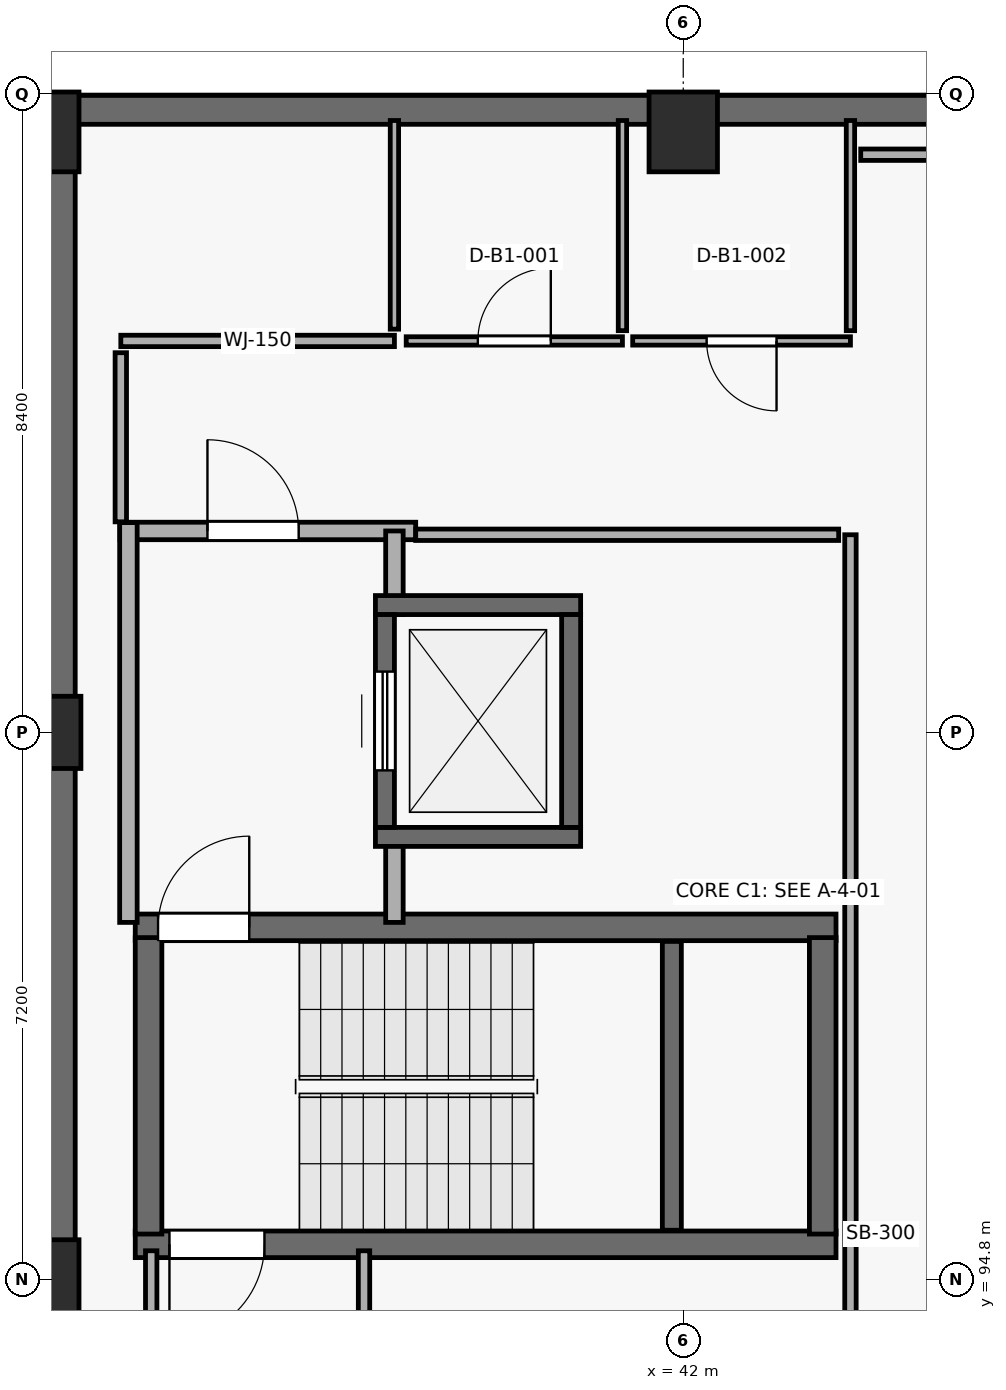
"""IFC4 building model, lengths in metres.
Left out: names, types, materials, properties, quantities, classifications, styles, units other than length and angle.
Written with IfcOpenShell. Run it as: python <this file> out.ifc"""

import sys

from ifc_helpers import new_model, si_unit, direction, frame, frame_2d, origin, origin_2d, place, context, subcontext, project, spatial, rectangle, extrude, element, fill, save


model = new_model("IFC4")
c1 = context("Model", 3, precision=1e-05, world=origin(), true_north=direction((0.0, 1.0)))
c2 = subcontext(c1, "Body", "Model", "MODEL_VIEW")
j1 = project(units=[si_unit("LENGTHUNIT", "METRE"), si_unit("PLANEANGLEUNIT", "RADIAN")], contexts=[c1])
p1 = place(None, origin())
s1 = spatial("IfcSite", under=j1, at=p1, CompositionType="ELEMENT")
p2 = place(p1, origin())
s2 = spatial("IfcBuilding", under=s1, at=p2, CompositionType="ELEMENT")
p3 = place(p2, frame((0.0, 0.0, -4.5)))
s3 = spatial("IfcBuildingStorey", under=s2, at=p3, CompositionType="ELEMENT", Elevation=-4.5)
p4 = place(p3, frame((33.6, 94.8, -0.3), z_axis=(0.0, 0.0, 1.0), x_axis=(1.0, 0.0, 0.0)))
e1 = element("IfcColumn", 1, at=p4, inside=s3, PredefinedType="COLUMN", context=c2, shape_type="SweptSolid", body=[
    extrude(rectangle(XDim=0.9, YDim=1.05, at=origin_2d()), origin(), (0.0, 0.0, 1.0), 4.8),
])
p5 = place(p3, frame((33.6, 102.0, -0.3), z_axis=(0.0, 0.0, 1.0), x_axis=(1.0, 0.0, 0.0)))
e2 = element("IfcColumn", 2, at=p5, inside=s3, PredefinedType="COLUMN", context=c2, shape_type="SweptSolid", body=[
    extrude(rectangle(XDim=0.95, YDim=0.95, at=origin_2d()), origin(), (0.0, 0.0, 1.0), 4.8),
])
for number, where, z_axis, x_axis in (
    (3, (33.6, 109.9, -0.3), (0.0, 0.0, 1.0), (1.0, 0.0, 0.0)),
    (4, (42.0, 109.9, -0.3), (0.0, 0.0, 1.0), (1.0, 0.0, 0.0)),
):
    element("IfcColumn", number, at=place(p3, frame(where, z_axis=z_axis, x_axis=x_axis)), inside=s3, PredefinedType="COLUMN", context=c2, shape_type="SweptSolid", body=[
        extrude(rectangle(XDim=0.9, YDim=1.05, at=origin_2d()), origin(), (0.0, 0.0, 1.0), 4.8),
    ])
p6 = place(p3, frame((33.81, 80.4, 0.0), z_axis=(0.0, 0.0, 1.0), x_axis=(0.0, 1.0, 0.0)))
e5 = element("IfcWall", 5, at=p6, inside=s3, PredefinedType="SOLIDWALL", context=c2, shape_type="SweptSolid", body=[
    extrude(rectangle(XDim=30.0, YDim=0.38, at=frame_2d((15.0, 0.0))), origin(), (0.0, 0.0, 1.0), 4.22),
])
p7 = place(p3, frame((33.6, 110.19, 0.0), z_axis=(0.0, 0.0, 1.0), x_axis=(1.0, 0.0, 0.0)))
e6 = element("IfcWall", 6, at=p7, inside=s3, PredefinedType="SOLIDWALL", context=c2, shape_type="SweptSolid", body=[
    extrude(rectangle(XDim=58.8, YDim=0.38, at=frame_2d((29.4, 0.0))), origin(), (0.0, 0.0, 1.0), 4.22),
])
p8 = place(p3, frame((34.79, 95.265, 0.0), z_axis=(0.0, 0.0, 1.0), x_axis=(1.0, 0.0, 0.0)))
e7 = element("IfcWall", 7, at=p8, inside=s3, PredefinedType="SHEAR", context=c2, shape_type="SweptSolid", body=[
    extrude(rectangle(XDim=9.22, YDim=0.35, at=frame_2d((4.61, 0.0))), origin(), (0.0, 0.0, 1.0), 4.22),
])
p9 = place(p8, frame((0.45, 0.0, 0.0)))
e8 = element("IfcOpeningElement", 8, at=p9, cuts=e7, PredefinedType="OPENING", context=c2, shape_type="SweptSolid", body=[
    extrude(rectangle(XDim=1.25, YDim=2.2, at=frame_2d((0.625, 1.1))), frame((0.0, 0.185, 0.0), z_axis=(0.0, -1.0, 0.0), x_axis=(1.0, 0.0, 0.0)), (0.0, 0.0, 1.0), 0.37),
])
p10 = place(p3, frame((44.01, 99.435, 0.0), z_axis=(0.0, 0.0, 1.0), x_axis=(-1.0, 0.0, 0.0)))
e9 = element("IfcWall", 9, at=p10, inside=s3, PredefinedType="SHEAR", context=c2, shape_type="SweptSolid", body=[
    extrude(rectangle(XDim=9.22, YDim=0.35, at=frame_2d((4.61, 0.0))), origin(), (0.0, 0.0, 1.0), 4.22),
])
p11 = place(p10, frame((7.72, 0.0, 0.0)))
e10 = element("IfcOpeningElement", 10, at=p11, cuts=e9, PredefinedType="OPENING", context=c2, shape_type="SweptSolid", body=[
    extrude(rectangle(XDim=1.2, YDim=2.2, at=frame_2d((0.6, 1.1))), frame((0.0, 0.185, 0.0), z_axis=(0.0, -1.0, 0.0), x_axis=(1.0, 0.0, 0.0)), (0.0, 0.0, 1.0), 0.37),
])
for number, where, z_axis, x_axis in (
    (11, (34.965, 95.4, 0.0), (0.0, 0.0, 1.0), (0.0, 1.0, 0.0)),
    (12, (43.835, 99.3, 0.0), (0.0, 0.0, 1.0), (0.0, -1.0, 0.0)),
):
    element("IfcWall", number, at=place(p3, frame(where, z_axis=z_axis, x_axis=x_axis)), inside=s3, PredefinedType="SHEAR", context=c2, shape_type="SweptSolid", body=[
        extrude(rectangle(XDim=3.9, YDim=0.35, at=frame_2d((1.95, 0.0))), origin(), (0.0, 0.0, 1.0), 4.22),
    ])
p12 = place(p3, frame((41.85, 95.45, 0.0), z_axis=(0.0, 0.0, 1.0), x_axis=(0.0, 1.0, 0.0)))
e13 = element("IfcWall", 13, at=p12, inside=s3, PredefinedType="SHEAR", context=c2, shape_type="SweptSolid", body=[
    extrude(rectangle(XDim=3.8, YDim=0.25, at=frame_2d((1.9, 0.0))), origin(), (0.0, 0.0, 1.0), 2.07),
])
p13 = place(p3, frame((34.59, 104.65, 0.0), z_axis=(0.0, 0.0, 1.0), x_axis=(1.0, 0.0, 0.0)))
e14 = element("IfcWall", 14, at=p13, inside=s3, PredefinedType="PARTITIONING", context=c2, shape_type="SweptSolid", body=[
    extrude(rectangle(XDim=3.89, YDim=0.23, at=frame_2d((1.945, 0.0))), origin(), (0.0, 0.0, 1.0), 4.22),
])
p14 = place(p13, frame((1.15, 0.0, 0.0)))
e15 = element("IfcOpeningElement", 15, at=p14, cuts=e14, PredefinedType="OPENING", context=c2, shape_type="SweptSolid", body=[
    extrude(rectangle(XDim=1.2, YDim=2.2, at=frame_2d((0.6, 1.1))), frame((0.0, 0.125, 0.0), z_axis=(0.0, -1.0, 0.0), x_axis=(1.0, 0.0, 0.0)), (0.0, 0.0, 1.0), 0.25),
])
p15 = place(p3, frame((34.7, 99.5, 0.0), z_axis=(0.0, 0.0, 1.0), x_axis=(0.0, 1.0, 0.0)))
e16 = element("IfcWall", 16, at=p15, inside=s3, PredefinedType="PARTITIONING", context=c2, shape_type="SweptSolid", body=[
    extrude(rectangle(XDim=5.26, YDim=0.23, at=frame_2d((2.63, 0.0))), origin(), (0.0, 0.0, 1.0), 4.22),
])
p16 = place(p3, frame((38.2, 104.65, 0.0), z_axis=(0.0, 0.0, 1.0), x_axis=(0.0, -1.0, 0.0)))
e17 = element("IfcWall", 17, at=p16, inside=s3, PredefinedType="PARTITIONING", context=c2, shape_type="SweptSolid", body=[
    extrude(rectangle(XDim=1.1, YDim=0.23, at=frame_2d((0.55, 0.0))), origin(), (0.0, 0.0, 1.0), 4.22),
])
p17 = place(p3, frame((38.2, 100.75, 0.0), z_axis=(0.0, 0.0, 1.0), x_axis=(0.0, -1.0, 0.0)))
e18 = element("IfcWall", 18, at=p17, inside=s3, PredefinedType="PARTITIONING", context=c2, shape_type="SweptSolid", body=[
    extrude(rectangle(XDim=1.25, YDim=0.23, at=frame_2d((0.625, 0.0))), origin(), (0.0, 0.0, 1.0), 4.22),
])
for number, where, z_axis, x_axis in (
    (19, (37.95, 100.625, 0.0), (0.0, 0.0, 1.0), (1.0, 0.0, 0.0)),
    (20, (40.65, 103.675, 0.0), (0.0, 0.0, 1.0), (-1.0, 0.0, 0.0)),
):
    element("IfcWall", number, at=place(p3, frame(where, z_axis=z_axis, x_axis=x_axis)), inside=s3, PredefinedType="SHEAR", context=c2, shape_type="SweptSolid", body=[
        extrude(rectangle(XDim=2.7, YDim=0.25, at=frame_2d((1.35, 0.0))), origin(), (0.0, 0.0, 1.0), 4.22),
    ])
p18 = place(p3, frame((38.075, 100.75, 0.0), z_axis=(0.0, 0.0, 1.0), x_axis=(0.0, 1.0, 0.0)))
e21 = element("IfcWall", 21, at=p18, inside=s3, PredefinedType="SHEAR", context=c2, shape_type="SweptSolid", body=[
    extrude(rectangle(XDim=2.8, YDim=0.25, at=frame_2d((1.4, 0.0))), origin(), (0.0, 0.0, 1.0), 4.22),
])
p19 = place(p18, frame((0.75, 0.0, 0.0)))
e22 = element("IfcOpeningElement", 22, at=p19, cuts=e21, PredefinedType="OPENING", context=c2, shape_type="SweptSolid", body=[
    extrude(rectangle(XDim=1.3, YDim=2.25, at=frame_2d((0.65, 1.125))), frame((0.0, 0.135, 0.0), z_axis=(0.0, -1.0, 0.0), x_axis=(1.0, 0.0, 0.0)), (0.0, 0.0, 1.0), 0.27),
])
p20 = place(p3, frame((40.525, 103.55, 0.0), z_axis=(0.0, 0.0, 1.0), x_axis=(0.0, -1.0, 0.0)))
e23 = element("IfcWall", 23, at=p20, inside=s3, PredefinedType="SHEAR", context=c2, shape_type="SweptSolid", body=[
    extrude(rectangle(XDim=2.8, YDim=0.25, at=frame_2d((1.4, 0.0))), origin(), (0.0, 0.0, 1.0), 4.22),
])
p21 = place(p3, frame((44.2, 104.6, 0.0), z_axis=(0.0, 0.0, 1.0), x_axis=(0.0, -1.0, 0.0)))
e24 = element("IfcWall", 24, at=p21, inside=s3, PredefinedType="PARTITIONING", context=c2, shape_type="SweptSolid", body=[
    extrude(rectangle(XDim=10.75, YDim=0.15, at=frame_2d((5.375, 0.0))), origin(), (0.0, 0.0, 1.0), 4.22),
])
p22 = place(p3, frame((38.48, 104.6, 0.0), z_axis=(0.0, 0.0, 1.0), x_axis=(1.0, 0.0, 0.0)))
e25 = element("IfcWall", 25, at=p22, inside=s3, PredefinedType="PARTITIONING", context=c2, shape_type="SweptSolid", body=[
    extrude(rectangle(XDim=5.565, YDim=0.15, at=frame_2d((2.782, 0.0))), origin(), (0.0, 0.0, 1.0), 4.22),
])
p23 = place(p3, frame((38.2, 107.15, 0.0), z_axis=(0.0, 0.0, 1.0), x_axis=(-1.0, 0.0, 0.0)))
e26 = element("IfcWall", 26, at=p23, inside=s3, PredefinedType="PARTITIONING", context=c2, shape_type="SweptSolid", body=[
    extrude(rectangle(XDim=3.6, YDim=0.15, at=frame_2d((1.8, 0.0))), origin(), (0.0, 0.0, 1.0), 4.22),
])
p24 = place(p3, frame((41.2, 107.15, 0.0), z_axis=(0.0, 0.0, 1.0), x_axis=(-1.0, 0.0, 0.0)))
e27 = element("IfcWall", 27, at=p24, inside=s3, PredefinedType="PARTITIONING", context=c2, shape_type="SweptSolid", body=[
    extrude(rectangle(XDim=2.845, YDim=0.11, at=frame_2d((1.422, 0.0))), origin(), (0.0, 0.0, 1.0), 4.22),
])
p25 = place(p24, frame((0.942, 0.0, 0.0)))
e28 = element("IfcOpeningElement", 28, at=p25, cuts=e27, PredefinedType="OPENING", context=c2, shape_type="SweptSolid", body=[
    extrude(rectangle(XDim=0.96, YDim=2.14, at=frame_2d((0.48, 1.07))), frame((0.0, 0.065, 0.0), z_axis=(0.0, -1.0, 0.0), x_axis=(1.0, 0.0, 0.0)), (0.0, 0.0, 1.0), 0.13),
])
p26 = place(p3, frame((44.2, 107.15, 0.0), z_axis=(0.0, 0.0, 1.0), x_axis=(-1.0, 0.0, 0.0)))
e29 = element("IfcWall", 29, at=p26, inside=s3, PredefinedType="PARTITIONING", context=c2, shape_type="SweptSolid", body=[
    extrude(rectangle(XDim=2.865, YDim=0.11, at=frame_2d((1.433, 0.0))), origin(), (0.0, 0.0, 1.0), 4.22),
])
p27 = place(p26, frame((0.972, 0.0, 0.0)))
e30 = element("IfcOpeningElement", 30, at=p27, cuts=e29, PredefinedType="OPENING", context=c2, shape_type="SweptSolid", body=[
    extrude(rectangle(XDim=0.92, YDim=2.12, at=frame_2d((0.46, 1.06))), frame((0.0, 0.065, 0.0), z_axis=(0.0, -1.0, 0.0), x_axis=(1.0, 0.0, 0.0)), (0.0, 0.0, 1.0), 0.13),
])
p28 = place(p3, frame((41.2, 110.05, 0.0), z_axis=(0.0, 0.0, 1.0), x_axis=(0.0, -1.0, 0.0)))
e31 = element("IfcWall", 31, at=p28, inside=s3, PredefinedType="PARTITIONING", context=c2, shape_type="SweptSolid", body=[
    extrude(rectangle(XDim=2.765, YDim=0.11, at=frame_2d((1.383, 0.0))), origin(), (0.0, 0.0, 1.0), 4.22),
])
p29 = place(p3, frame((38.2, 107.305, 0.0), z_axis=(0.0, 0.0, 1.0), x_axis=(0.0, 1.0, 0.0)))
e32 = element("IfcWall", 32, at=p29, inside=s3, PredefinedType="PARTITIONING", context=c2, shape_type="SweptSolid", body=[
    extrude(rectangle(XDim=2.745, YDim=0.11, at=frame_2d((1.373, 0.0))), origin(), (0.0, 0.0, 1.0), 4.22),
])
p30 = place(p3, frame((44.2, 110.05, 0.0), z_axis=(0.0, 0.0, 1.0), x_axis=(0.0, -1.0, 0.0)))
e33 = element("IfcWall", 33, at=p30, inside=s3, PredefinedType="PARTITIONING", context=c2, shape_type="SweptSolid", body=[
    extrude(rectangle(XDim=2.765, YDim=0.11, at=frame_2d((1.383, 0.0))), origin(), (0.0, 0.0, 1.0), 4.22),
])
p31 = place(p3, frame((34.6, 106.995, 0.0), z_axis=(0.0, 0.0, 1.0), x_axis=(0.0, -1.0, 0.0)))
e34 = element("IfcWall", 34, at=p31, inside=s3, PredefinedType="PARTITIONING", context=c2, shape_type="SweptSolid", body=[
    extrude(rectangle(XDim=2.225, YDim=0.15, at=frame_2d((1.113, 0.0))), origin(), (0.0, 0.0, 1.0), 4.22),
])
p32 = place(p3, frame((46.245, 109.6, 0.0), z_axis=(0.0, 0.0, 1.0), x_axis=(-1.0, 0.0, 0.0)))
e35 = element("IfcWall", 35, at=p32, inside=s3, PredefinedType="PARTITIONING", context=c2, shape_type="SweptSolid", body=[
    extrude(rectangle(XDim=1.91, YDim=0.15, at=frame_2d((0.955, 0.0))), origin(), (0.0, 0.0, 1.0), 3.46),
])
p33 = place(p3, frame((37.8, 94.005, 0.0), z_axis=(0.0, 0.0, 1.0), x_axis=(0.0, 1.0, 0.0)))
e36 = element("IfcWall", 36, at=p33, inside=s3, PredefinedType="PARTITIONING", context=c2, shape_type="SweptSolid", body=[
    extrude(rectangle(XDim=1.175, YDim=0.15, at=frame_2d((0.587, 0.0))), origin(), (0.0, 0.0, 1.0), 4.22),
])
p34 = place(p3, frame((35.0, 95.18, 0.0), z_axis=(0.0, 0.0, 1.0), x_axis=(0.0, -1.0, 0.0)))
e37 = element("IfcWall", 37, at=p34, inside=s3, PredefinedType="PARTITIONING", context=c2, shape_type="SweptSolid", body=[
    extrude(rectangle(XDim=1.33, YDim=0.15, at=frame_2d((0.665, 0.0))), origin(), (0.0, 0.0, 1.0), 4.22),
])
p35 = place(p9, origin())
e38 = element("IfcDoor", 38, at=p35, inside=s3, OperationType="SINGLE_SWING_RIGHT", PredefinedType="DOOR", context=c2, shape_type="SweptSolid", body=[
    extrude(rectangle(XDim=1.25, YDim=2.2, at=frame_2d((0.625, 1.1))), frame((0.0, 0.025, 0.0), z_axis=(0.0, -1.0, 0.0), x_axis=(1.0, 0.0, 0.0)), (0.0, 0.0, 1.0), 0.05),
])
fill(e8, e38)
p36 = place(p11, origin())
e39 = element("IfcDoor", 39, at=p36, inside=s3, OperationType="SINGLE_SWING_RIGHT", PredefinedType="DOOR", context=c2, shape_type="SweptSolid", body=[
    extrude(rectangle(XDim=1.2, YDim=2.2, at=frame_2d((0.6, 1.1))), frame((0.0, 0.025, 0.0), z_axis=(0.0, -1.0, 0.0), x_axis=(1.0, 0.0, 0.0)), (0.0, 0.0, 1.0), 0.05),
])
fill(e10, e39)
p37 = place(p14, origin())
e40 = element("IfcDoor", 40, at=p37, inside=s3, OperationType="SINGLE_SWING_LEFT", PredefinedType="DOOR", context=c2, shape_type="SweptSolid", body=[
    extrude(rectangle(XDim=1.2, YDim=2.2, at=frame_2d((0.6, 1.1))), frame((0.0, 0.025, 0.0), z_axis=(0.0, -1.0, 0.0), x_axis=(1.0, 0.0, 0.0)), (0.0, 0.0, 1.0), 0.05),
])
fill(e15, e40)
p38 = place(p19, origin())
e41 = element("IfcDoor", 41, at=p38, inside=s3, OperationType="SLIDING_TO_LEFT", PredefinedType="DOOR", context=c2, shape_type="SweptSolid", body=[
    extrude(rectangle(XDim=1.3, YDim=2.25, at=frame_2d((0.65, 1.125))), frame((0.0, 0.025, 0.0), z_axis=(0.0, -1.0, 0.0), x_axis=(1.0, 0.0, 0.0)), (0.0, 0.0, 1.0), 0.05),
])
fill(e22, e41)
p39 = place(p25, origin())
e42 = element("IfcDoor", 42, at=p39, inside=s3, OperationType="SINGLE_SWING_RIGHT", PredefinedType="DOOR", context=c2, shape_type="SweptSolid", body=[
    extrude(rectangle(XDim=0.96, YDim=2.14, at=frame_2d((0.48, 1.07))), frame((0.0, 0.025, 0.0), z_axis=(0.0, -1.0, 0.0), x_axis=(1.0, 0.0, 0.0)), (0.0, 0.0, 1.0), 0.05),
])
fill(e28, e42)
p40 = place(p27, origin())
e43 = element("IfcDoor", 43, at=p40, inside=s3, OperationType="SINGLE_SWING_LEFT", PredefinedType="DOOR", context=c2, shape_type="SweptSolid", body=[
    extrude(rectangle(XDim=0.92, YDim=2.12, at=frame_2d((0.46, 1.06))), frame((0.0, 0.025, 0.0), z_axis=(0.0, -1.0, 0.0), x_axis=(1.0, 0.0, 0.0)), (0.0, 0.0, 1.0), 0.05),
])
fill(e30, e43)
save(model, sys.argv[1])
